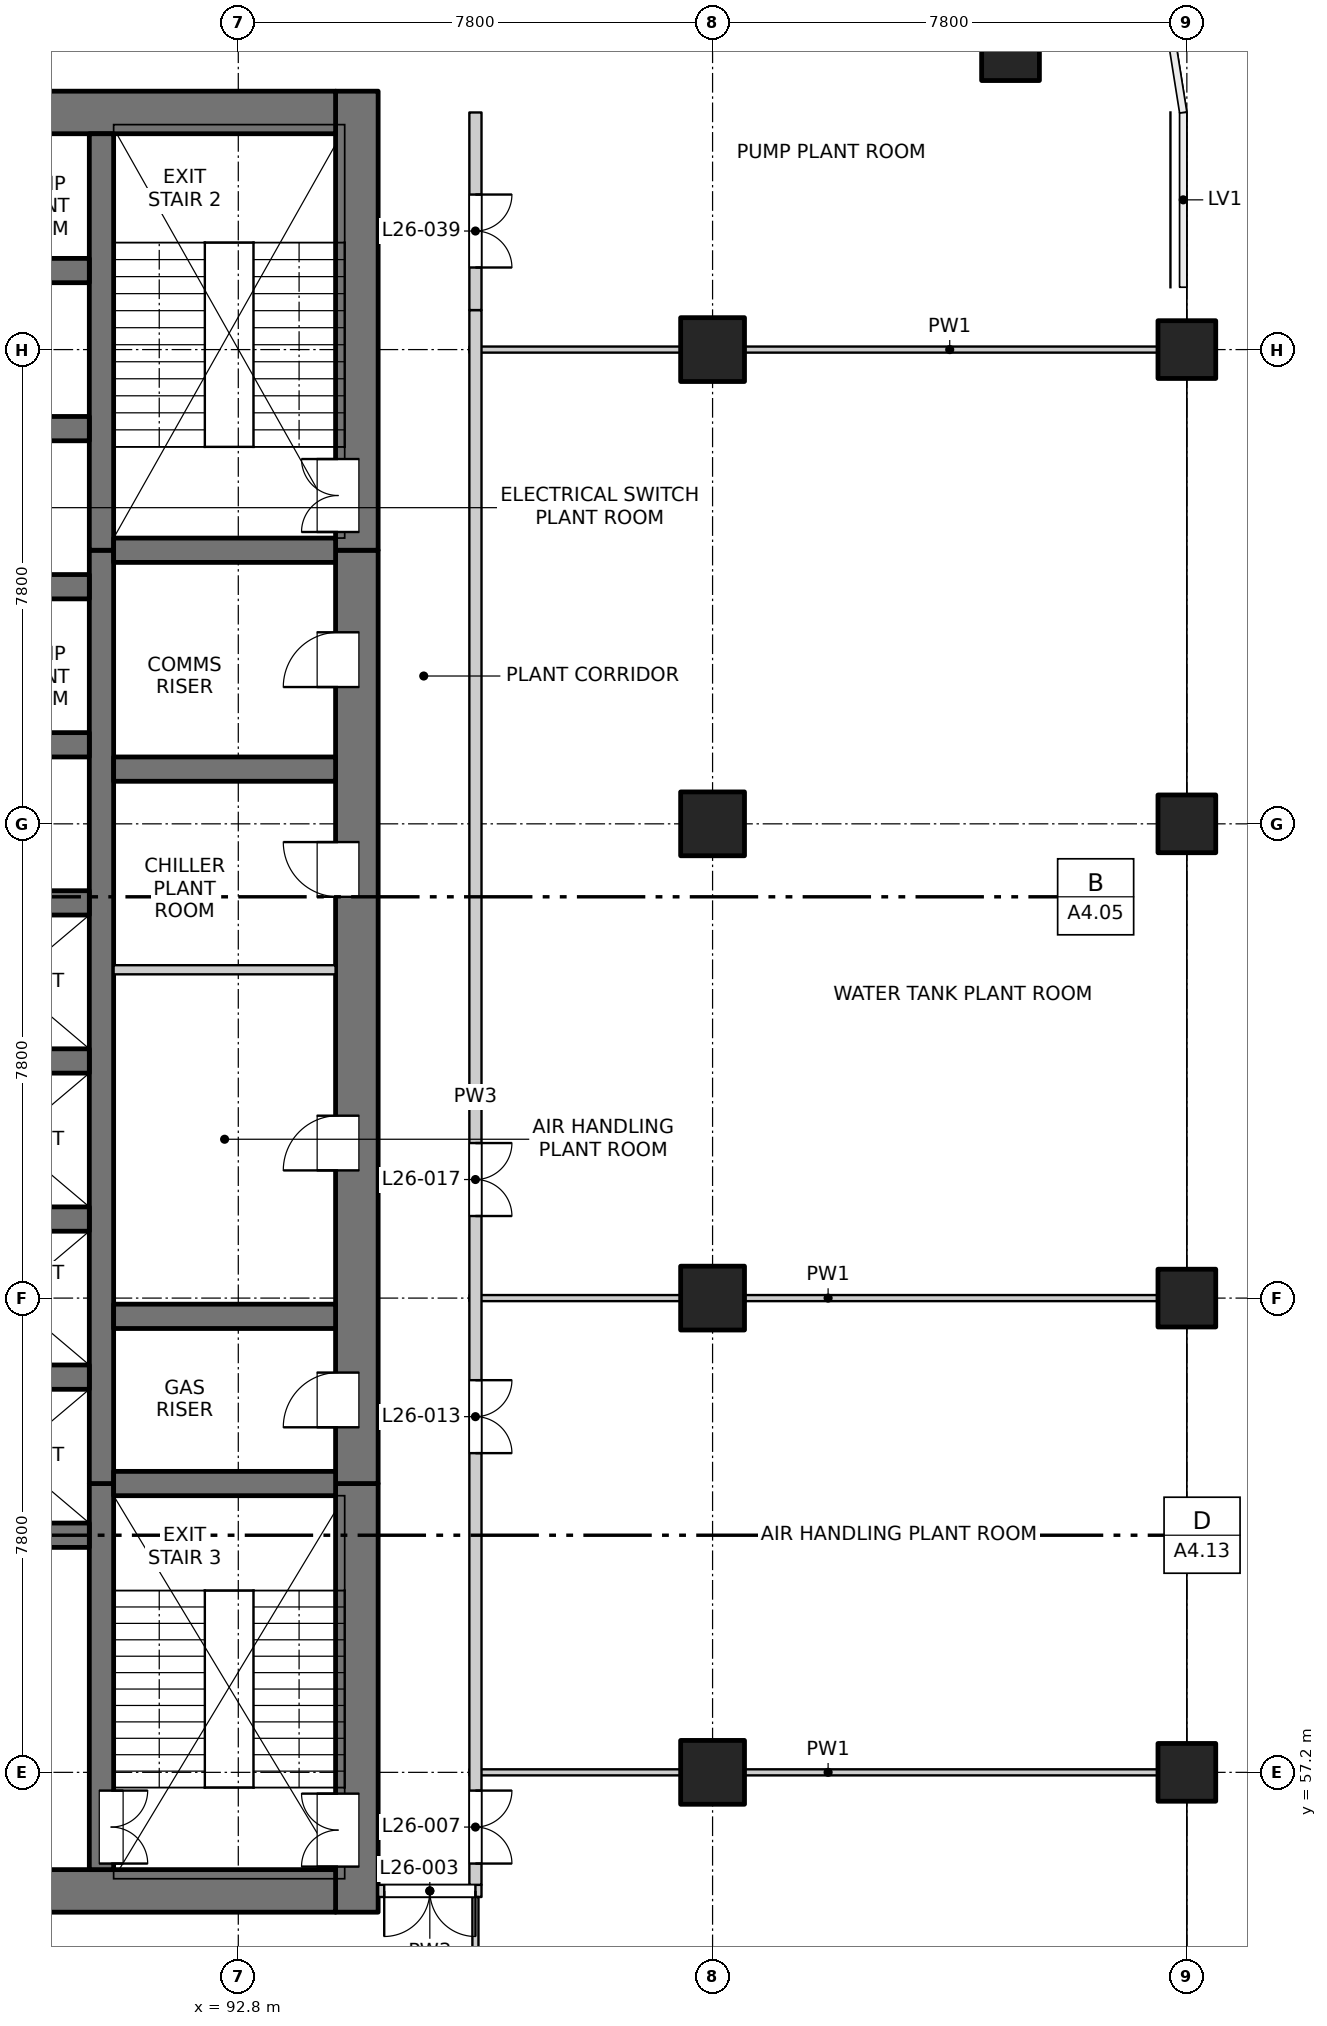
"""IFC4 building model, lengths in metres.
Left out: names, types, materials, properties, quantities, classifications, styles, units other than length and angle.
Written with IfcOpenShell. Run it as: python <this file> out.ifc"""

import sys

from ifc_helpers import new_model, si_unit, direction, frame, frame_2d, origin, origin_2d, place, context, subcontext, project, spatial, rectangle, extrude, element, fill, save


model = new_model("IFC4")
c1 = context("Model", 3, precision=1e-05, world=origin(), true_north=direction((0.0, 1.0)))
c2 = subcontext(c1, "Body", "Model", "MODEL_VIEW")
j1 = project(units=[si_unit("LENGTHUNIT", "METRE"), si_unit("PLANEANGLEUNIT", "RADIAN")], contexts=[c1])
p1 = place(None, origin())
s1 = spatial("IfcSite", under=j1, at=p1, CompositionType="ELEMENT")
p2 = place(p1, origin())
s2 = spatial("IfcBuilding", under=s1, at=p2, CompositionType="ELEMENT")
p3 = place(p2, frame((0.0, 0.0, 95.4)))
s3 = spatial("IfcBuildingStorey", under=s2, at=p3, CompositionType="ELEMENT", Elevation=95.4)
for number, where, z_axis, x_axis in (
    (1, (105.5, 85.5, -0.3), (0.0, 0.0, 1.0), (1.0, 0.0, 0.0)),
    (2, (108.4, 57.2, -0.3), (0.0, 0.0, 1.0), (1.0, 0.0, 0.0)),
    (3, (108.4, 65.0, -0.3), (0.0, 0.0, 1.0), (1.0, 0.0, 0.0)),
    (4, (108.4, 72.8, -0.3), (0.0, 0.0, 1.0), (1.0, 0.0, 0.0)),
    (5, (108.4, 80.6, -0.3), (0.0, 0.0, 1.0), (1.0, 0.0, 0.0)),
):
    element("IfcColumn", number, at=place(p3, frame(where, z_axis=z_axis, x_axis=x_axis)), inside=s3, PredefinedType="COLUMN", context=c2, shape_type="SweptSolid", body=[
        extrude(rectangle(XDim=0.95, YDim=0.95, at=origin_2d()), origin(), (0.0, 0.0, 1.0), 2.9),
    ])
for number, where, z_axis, x_axis in (
    (6, (100.6, 57.2, -0.3), (0.0, 0.0, 1.0), (1.0, 0.0, 0.0)),
    (7, (100.6, 65.0, -0.3), (0.0, 0.0, 1.0), (1.0, 0.0, 0.0)),
    (8, (100.6, 72.8, -0.3), (0.0, 0.0, 1.0), (1.0, 0.0, 0.0)),
    (9, (100.6, 80.6, -0.3), (0.0, 0.0, 1.0), (1.0, 0.0, 0.0)),
):
    element("IfcColumn", number, at=place(p3, frame(where, z_axis=z_axis, x_axis=x_axis)), inside=s3, PredefinedType="COLUMN", context=c2, shape_type="SweptSolid", body=[
        extrude(rectangle(XDim=1.05, YDim=1.05, at=origin_2d()), origin(), (0.0, 0.0, 1.0), 2.9),
    ])
p4 = place(p3, frame((94.75, 54.9, -0.3), z_axis=(0.0, 0.0, 1.0), x_axis=(0.0, 1.0, 0.0)))
e10 = element("IfcWall", 10, at=p4, inside=s3, PredefinedType="SOLIDWALL", context=c2, shape_type="SweptSolid", body=[
    extrude(rectangle(XDim=7.05, YDim=0.7, at=frame_2d((3.525, 0.0))), origin(), (0.0, 0.0, 1.0), 4.5),
])
p5 = place(p4, frame((0.75, 0.0, 0.3)))
e11 = element("IfcOpeningElement", 11, at=p5, cuts=e10, PredefinedType="OPENING", context=c2, shape_type="SweptSolid", body=[
    extrude(rectangle(XDim=1.2, YDim=2.1, at=frame_2d((0.6, 1.05))), frame((0.0, 0.36, 0.0), z_axis=(0.0, -1.0, 0.0), x_axis=(1.0, 0.0, 0.0)), (0.0, 0.0, 1.0), 0.72),
])
p6 = place(p3, frame((94.75, 61.95, -0.3), z_axis=(0.0, 0.0, 1.0), x_axis=(0.0, 1.0, 0.0)))
e12 = element("IfcWall", 12, at=p6, inside=s3, PredefinedType="SOLIDWALL", context=c2, shape_type="SweptSolid", body=[
    extrude(rectangle(XDim=15.35, YDim=0.7, at=frame_2d((7.675, 0.0))), origin(), (0.0, 0.0, 1.0), 4.5),
])
p7 = place(p6, frame((0.925, 0.0, 0.3)))
e13 = element("IfcOpeningElement", 13, at=p7, cuts=e12, PredefinedType="OPENING", context=c2, shape_type="SweptSolid", body=[
    extrude(rectangle(XDim=0.9, YDim=2.1, at=frame_2d((0.45, 1.05))), frame((0.0, 0.36, 0.0), z_axis=(0.0, -1.0, 0.0), x_axis=(1.0, 0.0, 0.0)), (0.0, 0.0, 1.0), 0.72),
])
p8 = place(p6, frame((5.15, 0.0, 0.3)))
e14 = element("IfcOpeningElement", 14, at=p8, cuts=e12, PredefinedType="OPENING", context=c2, shape_type="SweptSolid", body=[
    extrude(rectangle(XDim=0.9, YDim=2.1, at=frame_2d((0.45, 1.05))), frame((0.0, 0.36, 0.0), z_axis=(0.0, -1.0, 0.0), x_axis=(1.0, 0.0, 0.0)), (0.0, 0.0, 1.0), 0.72),
])
p9 = place(p6, frame((9.65, 0.0, 0.3)))
e15 = element("IfcOpeningElement", 15, at=p9, cuts=e12, PredefinedType="OPENING", context=c2, shape_type="SweptSolid", body=[
    extrude(rectangle(XDim=0.9, YDim=2.1, at=frame_2d((0.45, 1.05))), frame((0.0, 0.36, 0.0), z_axis=(0.0, -1.0, 0.0), x_axis=(1.0, 0.0, 0.0)), (0.0, 0.0, 1.0), 0.72),
])
p10 = place(p6, frame((13.1, 0.0, 0.3)))
e16 = element("IfcOpeningElement", 16, at=p10, cuts=e12, PredefinedType="OPENING", context=c2, shape_type="SweptSolid", body=[
    extrude(rectangle(XDim=0.9, YDim=2.1, at=frame_2d((0.45, 1.05))), frame((0.0, 0.36, 0.0), z_axis=(0.0, -1.0, 0.0), x_axis=(1.0, 0.0, 0.0)), (0.0, 0.0, 1.0), 0.72),
])
p11 = place(p3, frame((94.75, 77.3, -0.3), z_axis=(0.0, 0.0, 1.0), x_axis=(0.0, 1.0, 0.0)))
e17 = element("IfcWall", 17, at=p11, inside=s3, PredefinedType="SOLIDWALL", context=c2, shape_type="SweptSolid", body=[
    extrude(rectangle(XDim=7.55, YDim=0.7, at=frame_2d((3.775, 0.0))), origin(), (0.0, 0.0, 1.0), 4.5),
])
p12 = place(p11, frame((0.3, 0.0, 0.3)))
e18 = element("IfcOpeningElement", 18, at=p12, cuts=e17, PredefinedType="OPENING", context=c2, shape_type="SweptSolid", body=[
    extrude(rectangle(XDim=1.2, YDim=2.1, at=frame_2d((0.6, 1.05))), frame((0.0, 0.36, 0.0), z_axis=(0.0, -1.0, 0.0), x_axis=(1.0, 0.0, 0.0)), (0.0, 0.0, 1.0), 0.72),
])
p13 = place(p3, frame((75.6, 55.25, -0.3), z_axis=(0.0, 0.0, 1.0), x_axis=(1.0, 0.0, 0.0)))
e19 = element("IfcWall", 19, at=p13, inside=s3, PredefinedType="SOLIDWALL", context=c2, shape_type="SweptSolid", body=[
    extrude(rectangle(XDim=18.8, YDim=0.7, at=frame_2d((9.4, 0.0))), origin(), (0.0, 0.0, 1.0), 4.5),
])
p14 = place(p13, frame((7.15, 0.0, 0.3)))
e20 = element("IfcOpeningElement", 20, at=p14, cuts=e19, PredefinedType="OPENING", context=c2, shape_type="SweptSolid", body=[
    extrude(rectangle(XDim=1.5, YDim=2.1, at=frame_2d((0.75, 1.05))), frame((0.0, 0.36, 0.0), z_axis=(0.0, -1.0, 0.0), x_axis=(1.0, 0.0, 0.0)), (0.0, 0.0, 1.0), 0.72),
])
p15 = place(p3, frame((75.6, 84.5, -0.3), z_axis=(0.0, 0.0, 1.0), x_axis=(1.0, 0.0, 0.0)))
e21 = element("IfcWall", 21, at=p15, inside=s3, PredefinedType="SOLIDWALL", context=c2, shape_type="SweptSolid", body=[
    extrude(rectangle(XDim=18.8, YDim=0.7, at=frame_2d((9.4, 0.0))), origin(), (0.0, 0.0, 1.0), 4.5),
])
p16 = place(p3, frame((90.55, 55.6, -0.3), z_axis=(0.0, 0.0, 1.0), x_axis=(0.0, 1.0, 0.0)))
e22 = element("IfcWall", 22, at=p16, inside=s3, PredefinedType="SOLIDWALL", context=c2, shape_type="SweptSolid", body=[
    extrude(rectangle(XDim=6.35, YDim=0.4, at=frame_2d((3.175, 0.0))), origin(), (0.0, 0.0, 1.0), 4.5),
])
p17 = place(p16, frame((0.1, 0.0, 0.3)))
e23 = element("IfcOpeningElement", 23, at=p17, cuts=e22, PredefinedType="OPENING", context=c2, shape_type="SweptSolid", body=[
    extrude(rectangle(XDim=1.2, YDim=2.1, at=frame_2d((0.6, 1.05))), frame((0.0, 0.21, 0.0), z_axis=(0.0, -1.0, 0.0), x_axis=(1.0, 0.0, 0.0)), (0.0, 0.0, 1.0), 0.42),
])
p18 = place(p3, frame((90.55, 61.95, -0.3), z_axis=(0.0, 0.0, 1.0), x_axis=(0.0, 1.0, 0.0)))
e24 = element("IfcWall", 24, at=p18, inside=s3, PredefinedType="SOLIDWALL", context=c2, shape_type="SweptSolid", body=[
    extrude(rectangle(XDim=15.35, YDim=0.4, at=frame_2d((7.675, 0.0))), origin(), (0.0, 0.0, 1.0), 4.5),
])
p19 = place(p3, frame((90.55, 77.3, -0.3), z_axis=(0.0, 0.0, 1.0), x_axis=(0.0, 1.0, 0.0)))
e25 = element("IfcWall", 25, at=p19, inside=s3, PredefinedType="SOLIDWALL", context=c2, shape_type="SweptSolid", body=[
    extrude(rectangle(XDim=6.85, YDim=0.4, at=frame_2d((3.425, 0.0))), origin(), (0.0, 0.0, 1.0), 4.5),
])
for number, where, z_axis, x_axis in (
    (26, (87.35, 61.1, -0.3), (0.0, 0.0, 1.0), (1.0, 0.0, 0.0)),
    (27, (87.35, 63.7, -0.3), (0.0, 0.0, 1.0), (1.0, 0.0, 0.0)),
    (28, (87.35, 66.3, -0.3), (0.0, 0.0, 1.0), (1.0, 0.0, 0.0)),
    (29, (87.35, 68.9, -0.3), (0.0, 0.0, 1.0), (1.0, 0.0, 0.0)),
    (30, (87.35, 71.5, -0.3), (0.0, 0.0, 1.0), (1.0, 0.0, 0.0)),
    (31, (87.35, 74.1, -0.3), (0.0, 0.0, 1.0), (1.0, 0.0, 0.0)),
    (32, (87.35, 76.7, -0.3), (0.0, 0.0, 1.0), (1.0, 0.0, 0.0)),
    (33, (87.35, 79.3, -0.3), (0.0, 0.0, 1.0), (1.0, 0.0, 0.0)),
    (34, (87.35, 81.9, -0.3), (0.0, 0.0, 1.0), (1.0, 0.0, 0.0)),
):
    element("IfcWall", number, at=place(p3, frame(where, z_axis=z_axis, x_axis=x_axis)), inside=s3, PredefinedType="SOLIDWALL", context=c2, shape_type="SweptSolid", body=[
        extrude(rectangle(XDim=3.0, YDim=0.4, at=frame_2d((1.5, 0.0))), origin(), (0.0, 0.0, 1.0), 4.5),
    ])
for number, where, z_axis, x_axis in (
    (35, (90.75, 61.95, -0.3), (0.0, 0.0, 1.0), (1.0, 0.0, 0.0)),
    (36, (90.75, 64.7, -0.3), (0.0, 0.0, 1.0), (1.0, 0.0, 0.0)),
    (37, (90.75, 73.7, -0.3), (0.0, 0.0, 1.0), (1.0, 0.0, 0.0)),
    (38, (90.75, 77.3, -0.3), (0.0, 0.0, 1.0), (1.0, 0.0, 0.0)),
):
    element("IfcWall", number, at=place(p3, frame(where, z_axis=z_axis, x_axis=x_axis)), inside=s3, PredefinedType="SOLIDWALL", context=c2, shape_type="SweptSolid", body=[
        extrude(rectangle(XDim=3.65, YDim=0.4, at=frame_2d((1.825, 0.0))), origin(), (0.0, 0.0, 1.0), 4.5),
    ])
p20 = place(p3, frame((95.1, 55.25, 0.0), z_axis=(0.0, 0.0, 1.0), x_axis=(1.0, 0.0, 0.0)))
e39 = element("IfcWall", 39, at=p20, inside=s3, PredefinedType="PARTITIONING", context=c2, shape_type="SweptSolid", body=[
    extrude(rectangle(XDim=1.7, YDim=0.2, at=frame_2d((0.85, 0.0))), origin(), (0.0, 0.0, 1.0), 4.2),
])
p21 = place(p20, frame((0.1, 0.0, 0.0)))
e40 = element("IfcOpeningElement", 40, at=p21, cuts=e39, PredefinedType="OPENING", context=c2, shape_type="SweptSolid", body=[
    extrude(rectangle(XDim=1.5, YDim=2.1, at=frame_2d((0.75, 1.05))), frame((0.0, 0.11, 0.0), z_axis=(0.0, -1.0, 0.0), x_axis=(1.0, 0.0, 0.0)), (0.0, 0.0, 1.0), 0.22),
])
for number, where, z_axis, x_axis in (
    (41, (96.6, 57.2, 0.0), (0.0, 0.0, 1.0), (1.0, 0.0, 0.0)),
    (42, (96.6, 65.0, 0.0), (0.0, 0.0, 1.0), (1.0, 0.0, 0.0)),
):
    element("IfcWall", number, at=place(p3, frame(where, z_axis=z_axis, x_axis=x_axis)), inside=s3, PredefinedType="PARTITIONING", context=c2, shape_type="SweptSolid", body=[
        extrude(rectangle(XDim=11.8, YDim=0.1, at=frame_2d((5.9, 0.0))), origin(), (0.0, 0.0, 1.0), 4.2),
    ])
p22 = place(p3, frame((90.75, 70.4, 0.0), z_axis=(0.0, 0.0, 1.0), x_axis=(1.0, 0.0, 0.0)))
e43 = element("IfcWall", 43, at=p22, inside=s3, PredefinedType="PARTITIONING", context=c2, shape_type="SweptSolid", body=[
    extrude(rectangle(XDim=3.65, YDim=0.15, at=frame_2d((1.825, 0.0))), origin(), (0.0, 0.0, 1.0), 4.2),
])
p23 = place(p3, frame((96.6, 80.6, 0.0), z_axis=(0.0, 0.0, 1.0), x_axis=(1.0, 0.0, 0.0)))
e44 = element("IfcWall", 44, at=p23, inside=s3, PredefinedType="PARTITIONING", context=c2, shape_type="SweptSolid", body=[
    extrude(rectangle(XDim=4.0, YDim=0.1, at=frame_2d((2.0, 0.0))), origin(), (0.0, 0.0, 1.0), 2.6),
])
p24 = place(p3, frame((100.6, 80.6, 0.0), z_axis=(0.0, 0.0, 1.0), x_axis=(1.0, 0.0, 0.0)))
e45 = element("IfcWall", 45, at=p24, inside=s3, PredefinedType="PARTITIONING", context=c2, shape_type="SweptSolid", body=[
    extrude(rectangle(XDim=7.8, YDim=0.1, at=frame_2d((3.9, 0.0))), origin(), (0.0, 0.0, 1.0), 4.2),
])
p25 = place(p3, frame((96.7, 48.75, 0.0), z_axis=(0.0, 0.0, 1.0), x_axis=(0.0, 1.0, 0.0)))
e46 = element("IfcWall", 46, at=p25, inside=s3, PredefinedType="PARTITIONING", context=c2, shape_type="SweptSolid", body=[
    extrude(rectangle(XDim=6.4, YDim=0.1, at=frame_2d((3.2, 0.0))), origin(), (0.0, 0.0, 1.0), 4.2),
])
p26 = place(p3, frame((96.7, 55.35, 0.0), z_axis=(0.0, 0.0, 1.0), x_axis=(0.0, 1.0, 0.0)))
e47 = element("IfcWall", 47, at=p26, inside=s3, PredefinedType="PARTITIONING", context=c2, shape_type="SweptSolid", body=[
    extrude(rectangle(XDim=25.9, YDim=0.2, at=frame_2d((12.95, 0.0))), origin(), (0.0, 0.0, 1.0), 4.2),
])
p27 = place(p26, frame((0.35, 0.0, 0.0)))
e48 = element("IfcOpeningElement", 48, at=p27, cuts=e47, PredefinedType="OPENING", context=c2, shape_type="SweptSolid", body=[
    extrude(rectangle(XDim=1.2, YDim=2.1, at=frame_2d((0.6, 1.05))), frame((0.0, 0.11, 0.0), z_axis=(0.0, -1.0, 0.0), x_axis=(1.0, 0.0, 0.0)), (0.0, 0.0, 1.0), 0.22),
])
p28 = place(p26, frame((7.1, 0.0, 0.0)))
e49 = element("IfcOpeningElement", 49, at=p28, cuts=e47, PredefinedType="OPENING", context=c2, shape_type="SweptSolid", body=[
    extrude(rectangle(XDim=1.2, YDim=2.1, at=frame_2d((0.6, 1.05))), frame((0.0, 0.11, 0.0), z_axis=(0.0, -1.0, 0.0), x_axis=(1.0, 0.0, 0.0)), (0.0, 0.0, 1.0), 0.22),
])
p29 = place(p26, frame((11.0, 0.0, 0.0)))
e50 = element("IfcOpeningElement", 50, at=p29, cuts=e47, PredefinedType="OPENING", context=c2, shape_type="SweptSolid", body=[
    extrude(rectangle(XDim=1.2, YDim=2.1, at=frame_2d((0.6, 1.05))), frame((0.0, 0.11, 0.0), z_axis=(0.0, -1.0, 0.0), x_axis=(1.0, 0.0, 0.0)), (0.0, 0.0, 1.0), 0.22),
])
p30 = place(p3, frame((96.7, 81.25, 0.0), z_axis=(0.0, 0.0, 1.0), x_axis=(0.0, 1.0, 0.0)))
e51 = element("IfcWall", 51, at=p30, inside=s3, PredefinedType="PARTITIONING", context=c2, shape_type="SweptSolid", body=[
    extrude(rectangle(XDim=3.25, YDim=0.2, at=frame_2d((1.625, 0.0))), origin(), (0.0, 0.0, 1.0), 2.6),
])
p31 = place(p30, frame((0.7, 0.0, 0.0)))
e52 = element("IfcOpeningElement", 52, at=p31, cuts=e51, PredefinedType="OPENING", context=c2, shape_type="SweptSolid", body=[
    extrude(rectangle(XDim=1.2, YDim=2.1, at=frame_2d((0.6, 1.05))), frame((0.0, 0.11, 0.0), z_axis=(0.0, -1.0, 0.0), x_axis=(1.0, 0.0, 0.0)), (0.0, 0.0, 1.0), 0.22),
])
p32 = place(p21, origin())
e53 = element("IfcDoor", 53, at=p32, inside=s3, OperationType="DOUBLE_DOOR_SINGLE_SWING", PredefinedType="DOOR", context=c2, shape_type="SweptSolid", body=[
    extrude(rectangle(XDim=1.5, YDim=2.1, at=frame_2d((0.75, 1.05))), frame((0.0, 0.025, 0.0), z_axis=(0.0, -1.0, 0.0), x_axis=(1.0, 0.0, 0.0)), (0.0, 0.0, 1.0), 0.05),
])
fill(e40, e53)
p33 = place(p17, origin())
e54 = element("IfcDoor", 54, at=p33, inside=s3, OperationType="DOUBLE_DOOR_SINGLE_SWING", PredefinedType="DOOR", context=c2, shape_type="SweptSolid", body=[
    extrude(rectangle(XDim=1.2, YDim=2.1, at=frame_2d((0.6, 1.05))), frame((0.0, -0.135, 0.0), z_axis=(0.0, -1.0, 0.0), x_axis=(1.0, 0.0, 0.0)), (0.0, 0.0, 1.0), 0.05),
])
fill(e23, e54)
p34 = place(p5, origin())
e55 = element("IfcDoor", 55, at=p34, inside=s3, OperationType="DOUBLE_DOOR_SINGLE_SWING", PredefinedType="DOOR", context=c2, shape_type="SweptSolid", body=[
    extrude(rectangle(XDim=1.2, YDim=2.1, at=frame_2d((0.6, 1.05))), frame((0.0, 0.335, 0.0), z_axis=(0.0, -1.0, 0.0), x_axis=(1.0, 0.0, 0.0)), (0.0, 0.0, 1.0), 0.05),
])
fill(e11, e55)
p35 = place(p27, origin())
e56 = element("IfcDoor", 56, at=p35, inside=s3, OperationType="DOUBLE_DOOR_SINGLE_SWING", PredefinedType="DOOR", context=c2, shape_type="SweptSolid", body=[
    extrude(rectangle(XDim=1.2, YDim=2.1, at=frame_2d((0.6, 1.05))), frame((0.0, 0.025, 0.0), z_axis=(0.0, -1.0, 0.0), x_axis=(1.0, 0.0, 0.0)), (0.0, 0.0, 1.0), 0.05),
])
fill(e48, e56)
p36 = place(p28, origin())
e57 = element("IfcDoor", 57, at=p36, inside=s3, OperationType="DOUBLE_DOOR_SINGLE_SWING", PredefinedType="DOOR", context=c2, shape_type="SweptSolid", body=[
    extrude(rectangle(XDim=1.2, YDim=2.1, at=frame_2d((0.6, 1.05))), frame((0.0, 0.025, 0.0), z_axis=(0.0, -1.0, 0.0), x_axis=(1.0, 0.0, 0.0)), (0.0, 0.0, 1.0), 0.05),
])
fill(e49, e57)
p37 = place(p7, origin())
e58 = element("IfcDoor", 58, at=p37, inside=s3, OperationType="SINGLE_SWING_LEFT", PredefinedType="DOOR", context=c2, shape_type="SweptSolid", body=[
    extrude(rectangle(XDim=0.9, YDim=2.1, at=frame_2d((0.45, 1.05))), frame((0.0, 0.335, 0.0), z_axis=(0.0, -1.0, 0.0), x_axis=(1.0, 0.0, 0.0)), (0.0, 0.0, 1.0), 0.05),
])
fill(e13, e58)
p38 = place(p29, origin())
e59 = element("IfcDoor", 59, at=p38, inside=s3, OperationType="DOUBLE_DOOR_SINGLE_SWING", PredefinedType="DOOR", context=c2, shape_type="SweptSolid", body=[
    extrude(rectangle(XDim=1.2, YDim=2.1, at=frame_2d((0.6, 1.05))), frame((0.0, 0.025, 0.0), z_axis=(0.0, -1.0, 0.0), x_axis=(1.0, 0.0, 0.0)), (0.0, 0.0, 1.0), 0.05),
])
fill(e50, e59)
p39 = place(p8, origin())
e60 = element("IfcDoor", 60, at=p39, inside=s3, OperationType="SINGLE_SWING_LEFT", PredefinedType="DOOR", context=c2, shape_type="SweptSolid", body=[
    extrude(rectangle(XDim=0.9, YDim=2.1, at=frame_2d((0.45, 1.05))), frame((0.0, 0.335, 0.0), z_axis=(0.0, -1.0, 0.0), x_axis=(1.0, 0.0, 0.0)), (0.0, 0.0, 1.0), 0.05),
])
fill(e14, e60)
p40 = place(p9, origin())
e61 = element("IfcDoor", 61, at=p40, inside=s3, OperationType="SINGLE_SWING_RIGHT", PredefinedType="DOOR", context=c2, shape_type="SweptSolid", body=[
    extrude(rectangle(XDim=0.9, YDim=2.1, at=frame_2d((0.45, 1.05))), frame((0.0, 0.335, 0.0), z_axis=(0.0, -1.0, 0.0), x_axis=(1.0, 0.0, 0.0)), (0.0, 0.0, 1.0), 0.05),
])
fill(e15, e61)
p41 = place(p10, origin())
e62 = element("IfcDoor", 62, at=p41, inside=s3, OperationType="SINGLE_SWING_LEFT", PredefinedType="DOOR", context=c2, shape_type="SweptSolid", body=[
    extrude(rectangle(XDim=0.9, YDim=2.1, at=frame_2d((0.45, 1.05))), frame((0.0, 0.335, 0.0), z_axis=(0.0, -1.0, 0.0), x_axis=(1.0, 0.0, 0.0)), (0.0, 0.0, 1.0), 0.05),
])
fill(e16, e62)
p42 = place(p12, origin())
e63 = element("IfcDoor", 63, at=p42, inside=s3, OperationType="DOUBLE_DOOR_SINGLE_SWING", PredefinedType="DOOR", context=c2, shape_type="SweptSolid", body=[
    extrude(rectangle(XDim=1.2, YDim=2.1, at=frame_2d((0.6, 1.05))), frame((0.0, 0.335, 0.0), z_axis=(0.0, -1.0, 0.0), x_axis=(1.0, 0.0, 0.0)), (0.0, 0.0, 1.0), 0.05),
])
fill(e18, e63)
p43 = place(p31, origin())
e64 = element("IfcDoor", 64, at=p43, inside=s3, OperationType="DOUBLE_DOOR_SINGLE_SWING", PredefinedType="DOOR", context=c2, shape_type="SweptSolid", body=[
    extrude(rectangle(XDim=1.2, YDim=2.1, at=frame_2d((0.6, 1.05))), frame((0.0, 0.025, 0.0), z_axis=(0.0, -1.0, 0.0), x_axis=(1.0, 0.0, 0.0)), (0.0, 0.0, 1.0), 0.05),
])
fill(e52, e64)
save(model, sys.argv[1])
